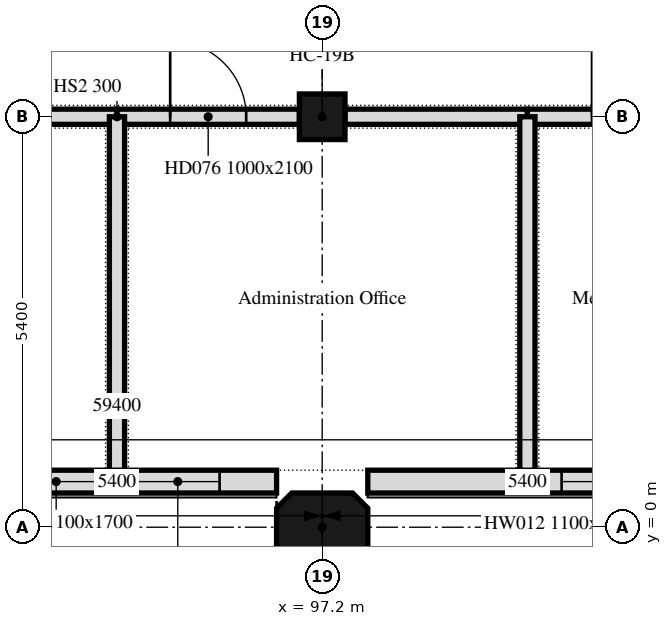
"""IFC4 building model, lengths in metres.
Left out: names, types, materials, properties, quantities, classifications, styles, units other than length and angle.
Written with IfcOpenShell. Run it as: python <this file> out.ifc"""

import sys

from ifc_helpers import new_model, si_unit, direction, frame, frame_2d, origin, origin_2d, place, context, subcontext, project, spatial, polyline, rectangle, outline, extrude, element, fill, save


model = new_model("IFC4")
c1 = context("Model", 3, precision=1e-05, world=origin(), true_north=direction((0.0, 1.0)))
c2 = subcontext(c1, "Body", "Model", "MODEL_VIEW")
j1 = project(units=[si_unit("LENGTHUNIT", "METRE"), si_unit("PLANEANGLEUNIT", "RADIAN")], contexts=[c1])
p1 = place(None, origin())
s1 = spatial("IfcSite", under=j1, at=p1, CompositionType="ELEMENT")
p2 = place(p1, origin())
s2 = spatial("IfcBuilding", under=s1, at=p2, CompositionType="ELEMENT")
p3 = place(p2, frame((0.0, 0.0, 19.8)))
s3 = spatial("IfcBuildingStorey", under=s2, at=p3, CompositionType="ELEMENT", Elevation=19.8)
p4 = place(p3, frame((97.2, 0.0, 0.0), z_axis=(0.0, 0.0, 1.0), x_axis=(1.0, 0.0, 0.0)))
e1 = element("IfcColumn", 1, at=p4, inside=s3, PredefinedType="COLUMN", context=c2, shape_type="SweptSolid", body=[
    extrude(outline(polyline([(-0.4, -0.45), (0.4, -0.45), (0.6, -0.25), (0.6, 0.25), (0.4, 0.45), (-0.4, 0.45), (-0.6, 0.25), (-0.6, -0.25), (-0.4, -0.45)])), origin(), (0.0, 0.0, 1.0), 3.802),
])
p5 = place(p3, frame((97.2, 5.4, 0.0), z_axis=(0.0, 0.0, 1.0), x_axis=(1.0, 0.0, 0.0)))
e2 = element("IfcColumn", 2, at=p5, inside=s3, PredefinedType="COLUMN", context=c2, shape_type="SweptSolid", body=[
    extrude(rectangle(XDim=0.6, YDim=0.6, at=origin_2d()), origin(), (0.0, 0.0, 1.0), 4.8),
])
p6 = place(p3, frame((92.4, 0.6, 0.0), z_axis=(0.0, 0.0, 1.0), x_axis=(1.0, 0.0, 0.0)))
e3 = element("IfcWall", 3, at=p6, inside=s3, PredefinedType="SOLIDWALL", context=c2, shape_type="SweptSolid", body=[
    extrude(outline(polyline([(0.0, 0.0), (4.2, 0.0), (4.2, 5.365), (0.0, 5.365), (0.0, 0.0)])), frame((0.0, 0.15, 0.0), z_axis=(0.0, -1.0, 0.0), x_axis=(1.0, 0.0, 0.0)), (0.0, 0.0, 1.0), 0.3),
])
p7 = place(p6, frame((0.75, 0.0, 0.9)))
e4 = element("IfcOpeningElement", 4, at=p7, cuts=e3, PredefinedType="OPENING", context=c2, shape_type="SweptSolid", body=[
    extrude(rectangle(XDim=1.1, YDim=1.7, at=frame_2d((0.55, 0.85))), frame((0.0, 0.15, 0.0), z_axis=(0.0, -1.0, 0.0), x_axis=(1.0, 0.0, 0.0)), (0.0, 0.0, 1.0), 0.3),
])
p8 = place(p6, frame((2.35, 0.0, 0.9)))
e5 = element("IfcOpeningElement", 5, at=p8, cuts=e3, PredefinedType="OPENING", context=c2, shape_type="SweptSolid", body=[
    extrude(rectangle(XDim=1.1, YDim=1.7, at=frame_2d((0.55, 0.85))), frame((0.0, 0.15, 0.0), z_axis=(0.0, -1.0, 0.0), x_axis=(1.0, 0.0, 0.0)), (0.0, 0.0, 1.0), 0.3),
])
p9 = place(p3, frame((97.8, 0.6, 0.0), z_axis=(0.0, 0.0, 1.0), x_axis=(1.0, 0.0, 0.0)))
e6 = element("IfcWall", 6, at=p9, inside=s3, PredefinedType="SOLIDWALL", context=c2, shape_type="SweptSolid", body=[
    extrude(outline(polyline([(0.0, 0.0), (4.2, 0.0), (4.2, 5.365), (0.0, 5.365), (0.0, 0.0)])), frame((0.0, 0.15, 0.0), z_axis=(0.0, -1.0, 0.0), x_axis=(1.0, 0.0, 0.0)), (0.0, 0.0, 1.0), 0.3),
])
p10 = place(p9, frame((2.55, 0.0, 0.9)))
e7 = element("IfcOpeningElement", 7, at=p10, cuts=e6, PredefinedType="OPENING", context=c2, shape_type="SweptSolid", body=[
    extrude(rectangle(XDim=1.1, YDim=1.7, at=frame_2d((0.55, 0.85))), frame((0.0, 0.15, 0.0), z_axis=(0.0, -1.0, 0.0), x_axis=(1.0, 0.0, 0.0)), (0.0, 0.0, 1.0), 0.3),
])
p11 = place(p3, frame((92.1, 5.4, 0.0), z_axis=(0.0, 0.0, 1.0), x_axis=(1.0, 0.0, 0.0)))
e8 = element("IfcWall", 8, at=p11, inside=s3, PredefinedType="PARTITIONING", context=c2, shape_type="SweptSolid", body=[
    extrude(rectangle(XDim=2.4, YDim=0.2, at=frame_2d((1.2, 0.0))), origin(), (0.0, 0.0, 1.0), 5.317),
])
p12 = place(p3, frame((94.5, 5.4, 0.0), z_axis=(0.0, 0.0, 1.0), x_axis=(1.0, 0.0, 0.0)))
e9 = element("IfcWall", 9, at=p12, inside=s3, PredefinedType="PARTITIONING", context=c2, shape_type="SweptSolid", body=[
    extrude(rectangle(XDim=2.4, YDim=0.2, at=frame_2d((1.2, 0.0))), origin(), (0.0, 0.0, 1.0), 5.317),
])
p13 = place(p12, frame((0.7, 0.0, 0.0)))
e10 = element("IfcOpeningElement", 10, at=p13, cuts=e9, PredefinedType="OPENING", context=c2, shape_type="SweptSolid", body=[
    extrude(rectangle(XDim=1.0, YDim=2.1, at=frame_2d((0.5, 1.05))), frame((0.0, 0.1, 0.0), z_axis=(0.0, -1.0, 0.0), x_axis=(1.0, 0.0, 0.0)), (0.0, 0.0, 1.0), 0.2),
])
p14 = place(p3, frame((97.5, 5.4, 0.0), z_axis=(0.0, 0.0, 1.0), x_axis=(1.0, 0.0, 0.0)))
e11 = element("IfcWall", 11, at=p14, inside=s3, PredefinedType="PARTITIONING", context=c2, shape_type="SweptSolid", body=[
    extrude(rectangle(XDim=2.4, YDim=0.2, at=frame_2d((1.2, 0.0))), origin(), (0.0, 0.0, 1.0), 5.317),
])
p15 = place(p3, frame((99.9, 5.4, 0.0), z_axis=(0.0, 0.0, 1.0), x_axis=(1.0, 0.0, 0.0)))
e12 = element("IfcWall", 12, at=p15, inside=s3, PredefinedType="PARTITIONING", context=c2, shape_type="SweptSolid", body=[
    extrude(rectangle(XDim=2.7, YDim=0.2, at=frame_2d((1.35, 0.0))), origin(), (0.0, 0.0, 1.0), 5.317),
])
p16 = place(p15, frame((0.85, 0.0, 0.0)))
e13 = element("IfcOpeningElement", 13, at=p16, cuts=e12, PredefinedType="OPENING", context=c2, shape_type="SweptSolid", body=[
    extrude(rectangle(XDim=1.0, YDim=2.1, at=frame_2d((0.5, 1.05))), frame((0.0, 0.1, 0.0), z_axis=(0.0, -1.0, 0.0), x_axis=(1.0, 0.0, 0.0)), (0.0, 0.0, 1.0), 0.2),
])
for number, where, z_axis, x_axis in (
    (14, (94.5, 0.75, 0.0), (0.0, 0.0, 1.0), (0.0, 1.0, 0.0)),
    (15, (99.9, 0.75, 0.0), (0.0, 0.0, 1.0), (0.0, 1.0, 0.0)),
):
    element("IfcWall", number, at=place(p3, frame(where, z_axis=z_axis, x_axis=x_axis)), inside=s3, PredefinedType="PARTITIONING", context=c2, shape_type="SweptSolid", body=[
        extrude(outline(polyline([(0.0, 0.0), (4.65, 0.0), (4.65, 5.344), (0.0, 4.098), (0.0, 0.0)])), frame((0.0, 0.1, 0.0), z_axis=(0.0, -1.0, 0.0), x_axis=(1.0, 0.0, 0.0)), (0.0, 0.0, 1.0), 0.2),
    ])
p17 = place(p7, origin())
e16 = element("IfcWindow", 16, at=p17, inside=s3, PartitioningType="SINGLE_PANEL", PredefinedType="WINDOW", context=c2, shape_type="SweptSolid", body=[
    extrude(rectangle(XDim=1.1, YDim=1.7, at=frame_2d((0.55, 0.85))), frame((0.0, 0.03, 0.0), z_axis=(0.0, -1.0, 0.0), x_axis=(1.0, 0.0, 0.0)), (0.0, 0.0, 1.0), 0.06),
])
fill(e4, e16)
p18 = place(p8, origin())
e17 = element("IfcWindow", 17, at=p18, inside=s3, PartitioningType="SINGLE_PANEL", PredefinedType="WINDOW", context=c2, shape_type="SweptSolid", body=[
    extrude(rectangle(XDim=1.1, YDim=1.7, at=frame_2d((0.55, 0.85))), frame((0.0, 0.03, 0.0), z_axis=(0.0, -1.0, 0.0), x_axis=(1.0, 0.0, 0.0)), (0.0, 0.0, 1.0), 0.06),
])
fill(e5, e17)
p19 = place(p10, origin())
e18 = element("IfcWindow", 18, at=p19, inside=s3, PartitioningType="SINGLE_PANEL", PredefinedType="WINDOW", context=c2, shape_type="SweptSolid", body=[
    extrude(rectangle(XDim=1.1, YDim=1.7, at=frame_2d((0.55, 0.85))), frame((0.0, 0.03, 0.0), z_axis=(0.0, -1.0, 0.0), x_axis=(1.0, 0.0, 0.0)), (0.0, 0.0, 1.0), 0.06),
])
fill(e7, e18)
p20 = place(p13, origin())
e19 = element("IfcDoor", 19, at=p20, inside=s3, OperationType="SINGLE_SWING_LEFT", PredefinedType="DOOR", context=c2, shape_type="SweptSolid", body=[
    extrude(rectangle(XDim=1.0, YDim=2.1, at=frame_2d((0.5, 1.05))), frame((0.0, 0.025, 0.0), z_axis=(0.0, -1.0, 0.0), x_axis=(1.0, 0.0, 0.0)), (0.0, 0.0, 1.0), 0.05),
])
fill(e10, e19)
save(model, sys.argv[1])
